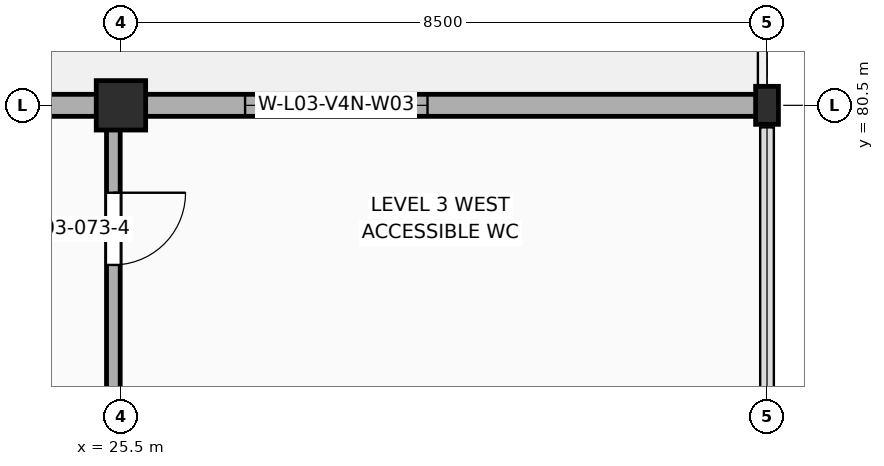
"""IFC4 building model, lengths in metres.
Left out: names, types, materials, properties, quantities, classifications, styles, units other than length and angle.
Written with IfcOpenShell. Run it as: python <this file> out.ifc"""

import sys

from ifc_helpers import new_model, si_unit, direction, frame, frame_2d, origin, origin_2d, place, context, subcontext, project, spatial, rectangle, hollow_rectangle, extrude, element, fill, save


model = new_model("IFC4")
c1 = context("Model", 3, precision=1e-05, world=origin(), true_north=direction((0.0, 1.0)))
c2 = subcontext(c1, "Body", "Model", "MODEL_VIEW")
j1 = project(units=[si_unit("LENGTHUNIT", "METRE"), si_unit("PLANEANGLEUNIT", "RADIAN")], contexts=[c1])
p1 = place(None, origin())
s1 = spatial("IfcSite", under=j1, at=p1, CompositionType="ELEMENT")
p2 = place(p1, origin())
s2 = spatial("IfcBuilding", under=s1, at=p2, CompositionType="ELEMENT")
p3 = place(p2, frame((0.0, 0.0, 15.0)))
s3 = spatial("IfcBuildingStorey", under=s2, at=p3, CompositionType="ELEMENT", Elevation=15.0)
p4 = place(p3, frame((25.5, 80.5, 0.0), z_axis=(0.0, 0.0, 1.0), x_axis=(1.0, 0.0, 0.0)))
e1 = element("IfcColumn", 1, at=p4, inside=s3, PredefinedType="COLUMN", context=c2, shape_type="SweptSolid", body=[
    extrude(rectangle(XDim=0.65, YDim=0.65, at=origin_2d()), origin(), (0.0, 0.0, 1.0), 4.54),
])
p5 = place(p3, frame((34.0, 80.5, 0.0), z_axis=(0.0, 0.0, 1.0), x_axis=(1.0, 0.0, 0.0)))
e2 = element("IfcColumn", 2, at=p5, inside=s3, PredefinedType="COLUMN", context=c2, shape_type="SweptSolid", body=[
    extrude(hollow_rectangle(XDim=0.3, YDim=0.5, WallThickness=0.016, at=origin_2d()), origin(), (0.0, 0.0, 1.0), 4.54),
])
p6 = place(p3, frame((0.0, 80.5, 0.0), z_axis=(0.0, 0.0, 1.0), x_axis=(1.0, 0.0, 0.0)))
e3 = element("IfcWall", 3, at=p6, inside=s3, PredefinedType="STANDARD", context=c2, shape_type="SweptSolid", body=[
    extrude(rectangle(XDim=34.0, YDim=0.29, at=frame_2d((17.0, 0.0))), origin(), (0.0, 0.0, 1.0), 4.158),
])
p7 = place(p6, frame((21.2, 0.0, 0.0)))
e4 = element("IfcOpeningElement", 4, at=p7, cuts=e3, PredefinedType="OPENING", context=c2, shape_type="SweptSolid", body=[
    extrude(rectangle(XDim=1.6, YDim=2.3, at=frame_2d((0.8, 1.15))), frame((0.0, 0.157, 0.0), z_axis=(0.0, -1.0, 0.0), x_axis=(1.0, 0.0, 0.0)), (0.0, 0.0, 1.0), 0.314),
])
p8 = place(p6, frame((4.467, 0.0, 1.0)))
e5 = element("IfcOpeningElement", 5, at=p8, cuts=e3, PredefinedType="OPENING", context=c2, shape_type="SweptSolid", body=[
    extrude(rectangle(XDim=2.4, YDim=1.8, at=frame_2d((1.2, 0.9))), frame((0.0, 0.157, 0.0), z_axis=(0.0, -1.0, 0.0), x_axis=(1.0, 0.0, 0.0)), (0.0, 0.0, 1.0), 0.314),
])
p9 = place(p6, frame((27.133, 0.0, 1.0)))
e6 = element("IfcOpeningElement", 6, at=p9, cuts=e3, PredefinedType="OPENING", context=c2, shape_type="SweptSolid", body=[
    extrude(rectangle(XDim=2.4, YDim=1.8, at=frame_2d((1.2, 0.9))), frame((0.0, 0.157, 0.0), z_axis=(0.0, -1.0, 0.0), x_axis=(1.0, 0.0, 0.0)), (0.0, 0.0, 1.0), 0.314),
])
p10 = place(p3, frame((25.4, 45.0, 0.0), z_axis=(0.0, 0.0, 1.0), x_axis=(0.0, 1.0, 0.0)))
e7 = element("IfcWall", 7, at=p10, inside=s3, PredefinedType="PARTITIONING", context=c2, shape_type="SweptSolid", body=[
    extrude(rectangle(XDim=35.2, YDim=0.18, at=frame_2d((17.6, 0.0))), origin(), (0.0, 0.0, 1.0), 3.89),
])
p11 = place(p10, frame((9.0, 0.0, 0.0)))
e8 = element("IfcOpeningElement", 8, at=p11, cuts=e7, PredefinedType="OPENING", context=c2, shape_type="SweptSolid", body=[
    extrude(rectangle(XDim=1.0, YDim=2.15, at=frame_2d((0.5, 1.075))), frame((0.0, 0.102, 0.0), z_axis=(0.0, -1.0, 0.0), x_axis=(1.0, 0.0, 0.0)), (0.0, 0.0, 1.0), 0.204),
])
p12 = place(p10, frame((24.5, 0.0, 0.0)))
e9 = element("IfcOpeningElement", 9, at=p12, cuts=e7, PredefinedType="OPENING", context=c2, shape_type="SweptSolid", body=[
    extrude(rectangle(XDim=0.9, YDim=2.15, at=frame_2d((0.45, 1.075))), frame((0.0, 0.102, 0.0), z_axis=(0.0, -1.0, 0.0), x_axis=(1.0, 0.0, 0.0)), (0.0, 0.0, 1.0), 0.204),
])
p13 = place(p10, frame((29.5, 0.0, 0.0)))
e10 = element("IfcOpeningElement", 10, at=p13, cuts=e7, PredefinedType="OPENING", context=c2, shape_type="SweptSolid", body=[
    extrude(rectangle(XDim=0.9, YDim=2.15, at=frame_2d((0.45, 1.075))), frame((0.0, 0.102, 0.0), z_axis=(0.0, -1.0, 0.0), x_axis=(1.0, 0.0, 0.0)), (0.0, 0.0, 1.0), 0.204),
])
p14 = place(p10, frame((33.4, 0.0, 0.0)))
e11 = element("IfcOpeningElement", 11, at=p14, cuts=e7, PredefinedType="OPENING", context=c2, shape_type="SweptSolid", body=[
    extrude(rectangle(XDim=0.95, YDim=2.15, at=frame_2d((0.475, 1.075))), frame((0.0, 0.102, 0.0), z_axis=(0.0, -1.0, 0.0), x_axis=(1.0, 0.0, 0.0)), (0.0, 0.0, 1.0), 0.204),
])
p15 = place(p9, origin())
e12 = element("IfcWindow", 12, at=p15, inside=s3, PartitioningType="SINGLE_PANEL", PredefinedType="WINDOW", context=c2, shape_type="SweptSolid", body=[
    extrude(rectangle(XDim=2.4, YDim=1.8, at=frame_2d((1.2, 0.9))), frame((0.0, 0.03, 0.0), z_axis=(0.0, -1.0, 0.0), x_axis=(1.0, 0.0, 0.0)), (0.0, 0.0, 1.0), 0.06),
])
fill(e6, e12)
p16 = place(p14, frame((0.95, 0.0, 0.0), z_axis=(0.0, 0.0, 1.0), x_axis=(-1.0, 0.0, 0.0)))
e13 = element("IfcDoor", 13, at=p16, inside=s3, OperationType="SINGLE_SWING_RIGHT", PredefinedType="DOOR", context=c2, shape_type="SweptSolid", body=[
    extrude(rectangle(XDim=0.95, YDim=2.15, at=frame_2d((0.475, 1.075))), frame((0.0, 0.025, 0.0), z_axis=(0.0, -1.0, 0.0), x_axis=(1.0, 0.0, 0.0)), (0.0, 0.0, 1.0), 0.05),
])
fill(e11, e13)
save(model, sys.argv[1])
